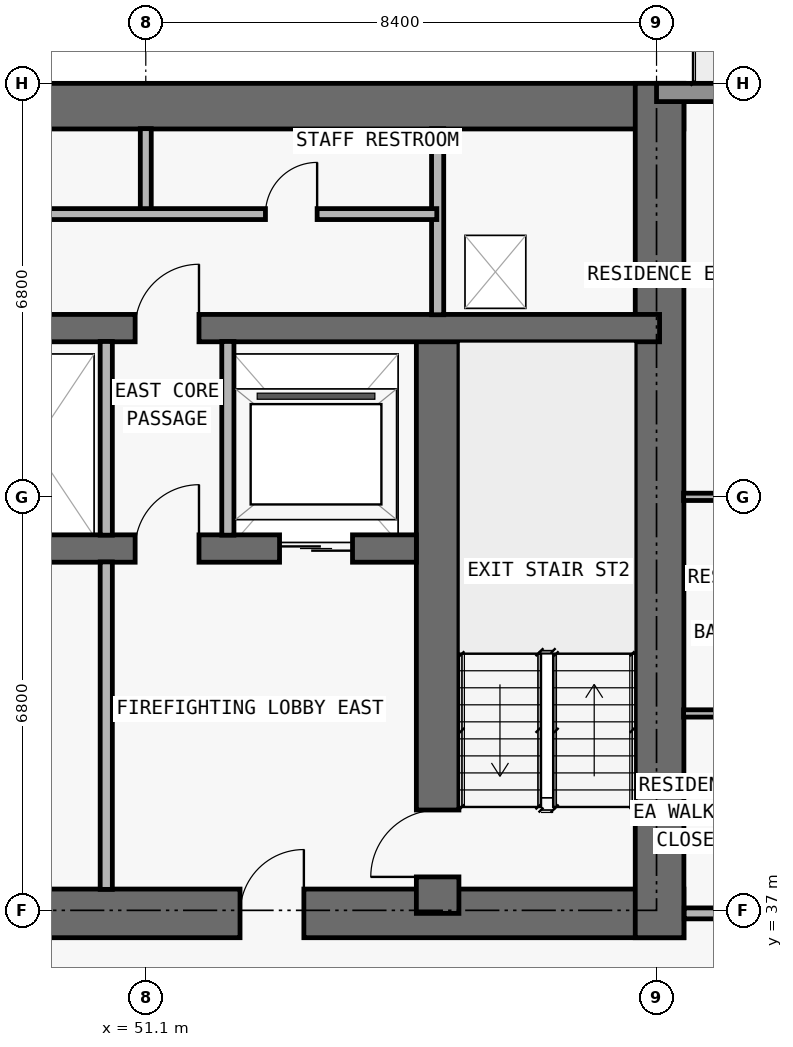
"""IFC4 building model, lengths in metres.
Left out: names, types, materials, properties, quantities, classifications, styles, units other than length and angle.
Written with IfcOpenShell. Run it as: python <this file> out.ifc"""

import sys

from ifc_helpers import new_model, si_unit, direction, frame, frame_2d, origin, place, context, subcontext, project, spatial, rectangle, extrude, element, fill, save


model = new_model("IFC4")
c1 = context("Model", 3, precision=1e-05, world=origin(), true_north=direction((0.0, 1.0)))
c2 = subcontext(c1, "Body", "Model", "MODEL_VIEW")
j1 = project(units=[si_unit("LENGTHUNIT", "METRE"), si_unit("PLANEANGLEUNIT", "RADIAN")], contexts=[c1])
p1 = place(None, origin())
s1 = spatial("IfcSite", under=j1, at=p1, CompositionType="ELEMENT")
p2 = place(p1, origin())
s2 = spatial("IfcBuilding", under=s1, at=p2, CompositionType="ELEMENT")
p3 = place(p2, frame((0.0, 0.0, 87.9)))
s3 = spatial("IfcBuildingStorey", under=s2, at=p3, CompositionType="ELEMENT", Elevation=87.9)
p4 = place(p3, frame((17.85, 36.95, 0.0), z_axis=(0.0, 0.0, 1.0), x_axis=(1.0, 0.0, 0.0)))
e1 = element("IfcWall", 1, at=p4, inside=s3, PredefinedType="SHEAR", context=c2, shape_type="SweptSolid", body=[
    extrude(rectangle(XDim=42.1, YDim=0.8, at=frame_2d((21.05, 0.0))), origin(), (0.0, 0.0, 1.0), 3.05),
])
p5 = place(p4, frame((14.45, 0.0, 0.0)))
e2 = element("IfcOpeningElement", 2, at=p5, cuts=e1, PredefinedType="OPENING", context=c2, shape_type="SweptSolid", body=[
    extrude(rectangle(XDim=1.1, YDim=2.15, at=frame_2d((0.55, 1.075))), frame((0.0, 0.41, 0.0), z_axis=(0.0, -1.0, 0.0), x_axis=(1.0, 0.0, 0.0)), (0.0, 0.0, 1.0), 0.82),
])
p6 = place(p4, frame((6.3, 0.0, 0.0)))
e3 = element("IfcOpeningElement", 3, at=p6, cuts=e1, PredefinedType="OPENING", context=c2, shape_type="SweptSolid", body=[
    extrude(rectangle(XDim=1.05, YDim=2.15, at=frame_2d((0.525, 1.075))), frame((0.0, 0.41, 0.0), z_axis=(0.0, -1.0, 0.0), x_axis=(1.0, 0.0, 0.0)), (0.0, 0.0, 1.0), 0.82),
])
p7 = place(p4, frame((34.8, 0.0, 0.0)))
e4 = element("IfcOpeningElement", 4, at=p7, cuts=e1, PredefinedType="OPENING", context=c2, shape_type="SweptSolid", body=[
    extrude(rectangle(XDim=1.05, YDim=2.15, at=frame_2d((0.525, 1.075))), frame((0.0, 0.41, 0.0), z_axis=(0.0, -1.0, 0.0), x_axis=(1.0, 0.0, 0.0)), (0.0, 0.0, 1.0), 0.82),
])
p8 = place(p4, frame((10.913, 0.0, 0.0)))
e5 = element("IfcOpeningElement", 5, at=p8, cuts=e1, PredefinedType="OPENING", context=c2, shape_type="SweptSolid", body=[
    extrude(rectangle(XDim=1.05, YDim=2.15, at=frame_2d((0.525, 1.075))), frame((0.0, 0.41, 0.0), z_axis=(0.0, -1.0, 0.0), x_axis=(1.0, 0.0, 0.0)), (0.0, 0.0, 1.0), 0.82),
])
p9 = place(p4, frame((24.15, 0.0, 0.0)))
e6 = element("IfcOpeningElement", 6, at=p9, cuts=e1, PredefinedType="OPENING", context=c2, shape_type="SweptSolid", body=[
    extrude(rectangle(XDim=1.05, YDim=2.15, at=frame_2d((0.525, 1.075))), frame((0.0, 0.41, 0.0), z_axis=(0.0, -1.0, 0.0), x_axis=(1.0, 0.0, 0.0)), (0.0, 0.0, 1.0), 0.82),
])
p10 = place(p3, frame((17.85, 50.225, 0.0), z_axis=(0.0, 0.0, 1.0), x_axis=(1.0, 0.0, 0.0)))
e7 = element("IfcWall", 7, at=p10, inside=s3, PredefinedType="SHEAR", context=c2, shape_type="SweptSolid", body=[
    extrude(rectangle(XDim=42.1, YDim=0.75, at=frame_2d((21.05, 0.0))), origin(), (0.0, 0.0, 1.0), 3.05),
])
p11 = place(p3, frame((59.55, 36.55, 0.0), z_axis=(0.0, 0.0, 1.0), x_axis=(0.0, 1.0, 0.0)))
e8 = element("IfcWall", 8, at=p11, inside=s3, PredefinedType="SHEAR", context=c2, shape_type="SweptSolid", body=[
    extrude(rectangle(XDim=14.05, YDim=0.8, at=frame_2d((7.025, 0.0))), origin(), (0.0, 0.0, 1.0), 3.05),
])
p12 = place(p3, frame((55.9, 36.95, 0.0), z_axis=(0.0, 0.0, 1.0), x_axis=(0.0, 1.0, 0.0)))
e9 = element("IfcWall", 9, at=p12, inside=s3, PredefinedType="SHEAR", context=c2, shape_type="SweptSolid", body=[
    extrude(rectangle(XDim=9.625, YDim=0.7, at=frame_2d((4.812, 0.0))), origin(), (0.0, 0.0, 1.0), 3.05),
])
p13 = place(p12, frame((0.6, 0.0, 0.0)))
e10 = element("IfcOpeningElement", 10, at=p13, cuts=e9, PredefinedType="OPENING", context=c2, shape_type="SweptSolid", body=[
    extrude(rectangle(XDim=1.1, YDim=2.15, at=frame_2d((0.55, 1.075))), frame((0.0, 0.36, 0.0), z_axis=(0.0, -1.0, 0.0), x_axis=(1.0, 0.0, 0.0)), (0.0, 0.0, 1.0), 0.72),
])
p14 = place(p3, frame((22.25, 42.95, 0.0), z_axis=(0.0, 0.0, 1.0), x_axis=(1.0, 0.0, 0.0)))
e11 = element("IfcWall", 11, at=p14, inside=s3, PredefinedType="SHEAR", context=c2, shape_type="SweptSolid", body=[
    extrude(rectangle(XDim=33.3, YDim=0.45, at=frame_2d((16.65, 0.0))), origin(), (0.0, 0.0, 1.0), 3.05),
])
p15 = place(p14, frame((1.05, 0.0, 0.0)))
e12 = element("IfcOpeningElement", 12, at=p15, cuts=e11, PredefinedType="OPENING", context=c2, shape_type="SweptSolid", body=[
    extrude(rectangle(XDim=1.2, YDim=2.2, at=frame_2d((0.6, 1.1))), frame((0.0, 0.235, 0.0), z_axis=(0.0, -1.0, 0.0), x_axis=(1.0, 0.0, 0.0)), (0.0, 0.0, 1.0), 0.47),
])
p16 = place(p14, frame((31.05, 0.0, 0.0)))
e13 = element("IfcOpeningElement", 13, at=p16, cuts=e11, PredefinedType="OPENING", context=c2, shape_type="SweptSolid", body=[
    extrude(rectangle(XDim=1.2, YDim=2.2, at=frame_2d((0.6, 1.1))), frame((0.0, 0.235, 0.0), z_axis=(0.0, -1.0, 0.0), x_axis=(1.0, 0.0, 0.0)), (0.0, 0.0, 1.0), 0.47),
])
p17 = place(p14, frame((13.5, 0.0, 0.0)))
e14 = element("IfcOpeningElement", 14, at=p17, cuts=e11, PredefinedType="OPENING", context=c2, shape_type="SweptSolid", body=[
    extrude(rectangle(XDim=1.1, YDim=2.2, at=frame_2d((0.55, 1.1))), frame((0.0, 0.235, 0.0), z_axis=(0.0, -1.0, 0.0), x_axis=(1.0, 0.0, 0.0)), (0.0, 0.0, 1.0), 0.47),
])
p18 = place(p14, frame((16.1, 0.0, 0.0)))
e15 = element("IfcOpeningElement", 15, at=p18, cuts=e11, PredefinedType="OPENING", context=c2, shape_type="SweptSolid", body=[
    extrude(rectangle(XDim=1.1, YDim=2.2, at=frame_2d((0.55, 1.1))), frame((0.0, 0.235, 0.0), z_axis=(0.0, -1.0, 0.0), x_axis=(1.0, 0.0, 0.0)), (0.0, 0.0, 1.0), 0.47),
])
p19 = place(p14, frame((18.7, 0.0, 0.0)))
e16 = element("IfcOpeningElement", 16, at=p19, cuts=e11, PredefinedType="OPENING", context=c2, shape_type="SweptSolid", body=[
    extrude(rectangle(XDim=1.1, YDim=2.2, at=frame_2d((0.55, 1.1))), frame((0.0, 0.235, 0.0), z_axis=(0.0, -1.0, 0.0), x_axis=(1.0, 0.0, 0.0)), (0.0, 0.0, 1.0), 0.47),
])
p20 = place(p14, frame((3.625, 0.0, 0.0)))
e17 = element("IfcOpeningElement", 17, at=p20, cuts=e11, PredefinedType="OPENING", context=c2, shape_type="SweptSolid", body=[
    extrude(rectangle(XDim=1.05, YDim=2.15, at=frame_2d((0.525, 1.075))), frame((0.0, 0.235, 0.0), z_axis=(0.0, -1.0, 0.0), x_axis=(1.0, 0.0, 0.0)), (0.0, 0.0, 1.0), 0.47),
])
p21 = place(p14, frame((28.675, 0.0, 0.0)))
e18 = element("IfcOpeningElement", 18, at=p21, cuts=e11, PredefinedType="OPENING", context=c2, shape_type="SweptSolid", body=[
    extrude(rectangle(XDim=1.05, YDim=2.15, at=frame_2d((0.525, 1.075))), frame((0.0, 0.235, 0.0), z_axis=(0.0, -1.0, 0.0), x_axis=(1.0, 0.0, 0.0)), (0.0, 0.0, 1.0), 0.47),
])
p22 = place(p3, frame((18.25, 46.575, 0.0), z_axis=(0.0, 0.0, 1.0), x_axis=(1.0, 0.0, 0.0)))
e19 = element("IfcWall", 19, at=p22, inside=s3, PredefinedType="SHEAR", context=c2, shape_type="SweptSolid", body=[
    extrude(rectangle(XDim=41.3, YDim=0.45, at=frame_2d((20.65, 0.0))), origin(), (0.0, 0.0, 1.0), 3.05),
])
p23 = place(p22, frame((7.625, 0.0, 0.0)))
e20 = element("IfcOpeningElement", 20, at=p23, cuts=e19, PredefinedType="OPENING", context=c2, shape_type="SweptSolid", body=[
    extrude(rectangle(XDim=1.05, YDim=2.15, at=frame_2d((0.525, 1.075))), frame((0.0, 0.235, 0.0), z_axis=(0.0, -1.0, 0.0), x_axis=(1.0, 0.0, 0.0)), (0.0, 0.0, 1.0), 0.47),
])
p24 = place(p22, frame((32.675, 0.0, 0.0)))
e21 = element("IfcOpeningElement", 21, at=p24, cuts=e19, PredefinedType="OPENING", context=c2, shape_type="SweptSolid", body=[
    extrude(rectangle(XDim=1.05, YDim=2.15, at=frame_2d((0.525, 1.075))), frame((0.0, 0.235, 0.0), z_axis=(0.0, -1.0, 0.0), x_axis=(1.0, 0.0, 0.0)), (0.0, 0.0, 1.0), 0.47),
])
p25 = place(p3, frame((59.5, 50.45, 0.0), z_axis=(0.0, 0.0, 1.0), x_axis=(1.0, 0.0, 0.0)))
e22 = element("IfcWall", 22, at=p25, inside=s3, PredefinedType="STANDARD", context=c2, shape_type="SweptSolid", body=[
    extrude(rectangle(XDim=10.6, YDim=0.3, at=frame_2d((5.3, 0.0))), origin(), (0.0, 0.0, 1.0), 3.05),
])
p26 = place(p25, frame((4.3, 0.0, 0.0)))
e23 = element("IfcOpeningElement", 23, at=p26, cuts=e22, PredefinedType="OPENING", context=c2, shape_type="SweptSolid", body=[
    extrude(rectangle(XDim=2.0, YDim=2.3, at=frame_2d((1.0, 1.15))), frame((0.0, 0.16, 0.0), z_axis=(0.0, -1.0, 0.0), x_axis=(1.0, 0.0, 0.0)), (0.0, 0.0, 1.0), 0.32),
])
p27 = place(p3, frame((50.45, 37.345, 0.0), z_axis=(0.0, 0.0, 1.0), x_axis=(0.0, 1.0, 0.0)))
e24 = element("IfcWall", 24, at=p27, inside=s3, PredefinedType="PARTITIONING", context=c2, shape_type="SweptSolid", body=[
    extrude(rectangle(XDim=5.385, YDim=0.2, at=frame_2d((2.692, 0.0))), origin(), (0.0, 0.0, 1.0), 3.05),
])
p28 = place(p3, frame((50.45, 43.17, 0.0), z_axis=(0.0, 0.0, 1.0), x_axis=(0.0, 1.0, 0.0)))
e25 = element("IfcWall", 25, at=p28, inside=s3, PredefinedType="PARTITIONING", context=c2, shape_type="SweptSolid", body=[
    extrude(rectangle(XDim=3.185, YDim=0.2, at=frame_2d((1.593, 0.0))), origin(), (0.0, 0.0, 1.0), 3.05),
])
p29 = place(p3, frame((51.1, 48.45, 0.0), z_axis=(0.0, 0.0, 1.0), x_axis=(0.0, 1.0, 0.0)))
e26 = element("IfcWall", 26, at=p29, inside=s3, PredefinedType="PARTITIONING", context=c2, shape_type="SweptSolid", body=[
    extrude(rectangle(XDim=1.405, YDim=0.18, at=frame_2d((0.703, 0.0))), origin(), (0.0, 0.0, 1.0), 3.05),
])
p30 = place(p3, frame((52.45, 43.17, 0.0), z_axis=(0.0, 0.0, 1.0), x_axis=(0.0, 1.0, 0.0)))
e27 = element("IfcWall", 27, at=p30, inside=s3, PredefinedType="PARTITIONING", context=c2, shape_type="SweptSolid", body=[
    extrude(rectangle(XDim=3.185, YDim=0.2, at=frame_2d((1.593, 0.0))), origin(), (0.0, 0.0, 1.0), 3.05),
])
p31 = place(p3, frame((55.9, 46.795, 0.0), z_axis=(0.0, 0.0, 1.0), x_axis=(0.0, 1.0, 0.0)))
e28 = element("IfcWall", 28, at=p31, inside=s3, PredefinedType="PARTITIONING", context=c2, shape_type="SweptSolid", body=[
    extrude(rectangle(XDim=3.06, YDim=0.2, at=frame_2d((1.53, 0.0))), origin(), (0.0, 0.0, 1.0), 3.05),
])
p32 = place(p3, frame((59.955, 36.95, 0.0), z_axis=(0.0, 0.0, 1.0), x_axis=(1.0, 0.0, 0.0)))
e29 = element("IfcWall", 29, at=p32, inside=s3, PredefinedType="PARTITIONING", context=c2, shape_type="SweptSolid", body=[
    extrude(rectangle(XDim=10.145, YDim=0.18, at=frame_2d((5.073, 0.0))), origin(), (0.0, 0.0, 1.0), 3.05),
])
p33 = place(p32, frame((3.957, 0.0, 0.0)))
e30 = element("IfcOpeningElement", 30, at=p33, cuts=e29, PredefinedType="OPENING", context=c2, shape_type="SweptSolid", body=[
    extrude(rectangle(XDim=1.0, YDim=2.2, at=frame_2d((0.5, 1.1))), frame((0.0, 0.1, 0.0), z_axis=(0.0, -1.0, 0.0), x_axis=(1.0, 0.0, 0.0)), (0.0, 0.0, 1.0), 0.2),
])
p34 = place(p3, frame((59.945, 40.238, 0.0), z_axis=(0.0, 0.0, 1.0), x_axis=(1.0, 0.0, 0.0)))
e31 = element("IfcWall", 31, at=p34, inside=s3, PredefinedType="PARTITIONING", context=c2, shape_type="SweptSolid", body=[
    extrude(rectangle(XDim=2.255, YDim=0.12, at=frame_2d((1.127, 0.0))), origin(), (0.0, 0.0, 1.0), 3.05),
])
p35 = place(p3, frame((59.945, 43.8, 0.0), z_axis=(0.0, 0.0, 1.0), x_axis=(1.0, 0.0, 0.0)))
e32 = element("IfcWall", 32, at=p35, inside=s3, PredefinedType="PARTITIONING", context=c2, shape_type="SweptSolid", body=[
    extrude(rectangle(XDim=13.66, YDim=0.12, at=frame_2d((6.83, 0.0))), origin(), (0.0, 0.0, 1.0), 2.339),
])
p36 = place(p35, frame((4.017, 0.0, 0.0)))
e33 = element("IfcOpeningElement", 33, at=p36, cuts=e32, PredefinedType="OPENING", context=c2, shape_type="SweptSolid", body=[
    extrude(rectangle(XDim=0.9, YDim=2.15, at=frame_2d((0.45, 1.075))), frame((0.0, 0.07, 0.0), z_axis=(0.0, -1.0, 0.0), x_axis=(1.0, 0.0, 0.0)), (0.0, 0.0, 1.0), 0.14),
])
p37 = place(p35, frame((0.702, 0.0, 0.0)))
e34 = element("IfcOpeningElement", 34, at=p37, cuts=e32, PredefinedType="OPENING", context=c2, shape_type="SweptSolid", body=[
    extrude(rectangle(XDim=0.85, YDim=2.1, at=frame_2d((0.425, 1.05))), frame((0.0, 0.07, 0.0), z_axis=(0.0, -1.0, 0.0), x_axis=(1.0, 0.0, 0.0)), (0.0, 0.0, 1.0), 0.14),
])
p38 = place(p3, frame((26.7, 48.45, 0.0), z_axis=(0.0, 0.0, 1.0), x_axis=(1.0, 0.0, 0.0)))
e35 = element("IfcWall", 35, at=p38, inside=s3, PredefinedType="PARTITIONING", context=c2, shape_type="SweptSolid", body=[
    extrude(rectangle(XDim=29.186, YDim=0.18, at=frame_2d((14.593, 0.0))), origin(), (0.0, 0.0, 1.0), 3.05),
])
p39 = place(p38, frame((1.75, 0.0, 0.0)))
e36 = element("IfcOpeningElement", 36, at=p39, cuts=e35, PredefinedType="OPENING", context=c2, shape_type="SweptSolid", body=[
    extrude(rectangle(XDim=1.2, YDim=2.2, at=frame_2d((0.6, 1.1))), frame((0.0, 0.1, 0.0), z_axis=(0.0, -1.0, 0.0), x_axis=(1.0, 0.0, 0.0)), (0.0, 0.0, 1.0), 0.2),
])
p40 = place(p38, frame((6.475, 0.0, 0.0)))
e37 = element("IfcOpeningElement", 37, at=p40, cuts=e35, PredefinedType="OPENING", context=c2, shape_type="SweptSolid", body=[
    extrude(rectangle(XDim=1.2, YDim=2.2, at=frame_2d((0.6, 1.1))), frame((0.0, 0.1, 0.0), z_axis=(0.0, -1.0, 0.0), x_axis=(1.0, 0.0, 0.0)), (0.0, 0.0, 1.0), 0.2),
])
p41 = place(p38, frame((14.05, 0.0, 0.0)))
e38 = element("IfcOpeningElement", 38, at=p41, cuts=e35, PredefinedType="OPENING", context=c2, shape_type="SweptSolid", body=[
    extrude(rectangle(XDim=1.0, YDim=2.2, at=frame_2d((0.5, 1.1))), frame((0.0, 0.1, 0.0), z_axis=(0.0, -1.0, 0.0), x_axis=(1.0, 0.0, 0.0)), (0.0, 0.0, 1.0), 0.2),
])
p42 = place(p38, frame((21.425, 0.0, 0.0)))
e39 = element("IfcOpeningElement", 39, at=p42, cuts=e35, PredefinedType="OPENING", context=c2, shape_type="SweptSolid", body=[
    extrude(rectangle(XDim=1.2, YDim=2.2, at=frame_2d((0.6, 1.1))), frame((0.0, 0.1, 0.0), z_axis=(0.0, -1.0, 0.0), x_axis=(1.0, 0.0, 0.0)), (0.0, 0.0, 1.0), 0.2),
])
p43 = place(p38, frame((26.368, 0.0, 0.0)))
e40 = element("IfcOpeningElement", 40, at=p43, cuts=e35, PredefinedType="OPENING", context=c2, shape_type="SweptSolid", body=[
    extrude(rectangle(XDim=0.85, YDim=2.1, at=frame_2d((0.425, 1.05))), frame((0.0, 0.1, 0.0), z_axis=(0.0, -1.0, 0.0), x_axis=(1.0, 0.0, 0.0)), (0.0, 0.0, 1.0), 0.2),
])
p44 = place(p16, origin())
e41 = element("IfcDoor", 41, at=p44, inside=s3, OperationType="DOUBLE_DOOR_SLIDING", PredefinedType="DOOR", context=c2, shape_type="SweptSolid", body=[
    extrude(rectangle(XDim=1.2, YDim=2.2, at=frame_2d((0.6, 1.1))), frame((0.0, 0.025, 0.0), z_axis=(0.0, -1.0, 0.0), x_axis=(1.0, 0.0, 0.0)), (0.0, 0.0, 1.0), 0.05),
])
fill(e13, e41)
p45 = place(p7, origin())
e42 = element("IfcDoor", 42, at=p45, inside=s3, OperationType="SINGLE_SWING_RIGHT", PredefinedType="DOOR", context=c2, shape_type="SweptSolid", body=[
    extrude(rectangle(XDim=1.05, YDim=2.15, at=frame_2d((0.525, 1.075))), frame((0.0, 0.025, 0.0), z_axis=(0.0, -1.0, 0.0), x_axis=(1.0, 0.0, 0.0)), (0.0, 0.0, 1.0), 0.05),
])
fill(e4, e42)
p46 = place(p13, origin())
e43 = element("IfcDoor", 43, at=p46, inside=s3, OperationType="SINGLE_SWING_LEFT", PredefinedType="DOOR", context=c2, shape_type="SweptSolid", body=[
    extrude(rectangle(XDim=1.1, YDim=2.15, at=frame_2d((0.55, 1.075))), frame((0.0, 0.025, 0.0), z_axis=(0.0, -1.0, 0.0), x_axis=(1.0, 0.0, 0.0)), (0.0, 0.0, 1.0), 0.05),
])
fill(e10, e43)
p47 = place(p21, origin())
e44 = element("IfcDoor", 44, at=p47, inside=s3, OperationType="SINGLE_SWING_RIGHT", PredefinedType="DOOR", context=c2, shape_type="SweptSolid", body=[
    extrude(rectangle(XDim=1.05, YDim=2.15, at=frame_2d((0.525, 1.075))), frame((0.0, 0.025, 0.0), z_axis=(0.0, -1.0, 0.0), x_axis=(1.0, 0.0, 0.0)), (0.0, 0.0, 1.0), 0.05),
])
fill(e18, e44)
p48 = place(p24, origin())
e45 = element("IfcDoor", 45, at=p48, inside=s3, OperationType="SINGLE_SWING_RIGHT", PredefinedType="DOOR", context=c2, shape_type="SweptSolid", body=[
    extrude(rectangle(XDim=1.05, YDim=2.15, at=frame_2d((0.525, 1.075))), frame((0.0, 0.025, 0.0), z_axis=(0.0, -1.0, 0.0), x_axis=(1.0, 0.0, 0.0)), (0.0, 0.0, 1.0), 0.05),
])
fill(e21, e45)
p49 = place(p43, origin())
e46 = element("IfcDoor", 46, at=p49, inside=s3, OperationType="SINGLE_SWING_RIGHT", PredefinedType="DOOR", context=c2, shape_type="SweptSolid", body=[
    extrude(rectangle(XDim=0.85, YDim=2.1, at=frame_2d((0.425, 1.05))), frame((0.0, 0.025, 0.0), z_axis=(0.0, -1.0, 0.0), x_axis=(1.0, 0.0, 0.0)), (0.0, 0.0, 1.0), 0.05),
])
fill(e40, e46)
save(model, sys.argv[1])
